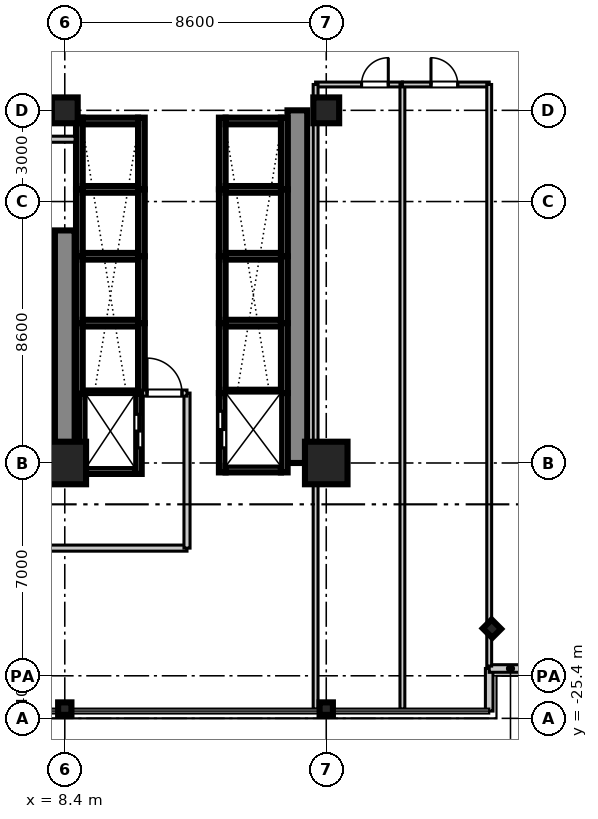
"""IFC4 building model, lengths in metres.
Left out: names, types, materials, properties, quantities, classifications, styles, units other than length and angle.
Written with IfcOpenShell. Run it as: python <this file> out.ifc"""

import sys

from ifc_helpers import new_model, si_unit, direction, frame, frame_2d, origin, origin_2d, place, context, subcontext, project, spatial, rectangle, i_section, extrude, source, transform, mapped, element, fill, save


model = new_model("IFC4")
c1 = context("Model", 3, precision=1e-05, world=origin(), true_north=direction((0.0, 1.0)))
c2 = subcontext(c1, "Body", "Model", "MODEL_VIEW")
j1 = project(units=[si_unit("LENGTHUNIT", "METRE"), si_unit("PLANEANGLEUNIT", "RADIAN")], contexts=[c1])
p1 = place(None, origin())
s1 = spatial("IfcSite", under=j1, at=p1, CompositionType="ELEMENT")
p2 = place(p1, origin())
s2 = spatial("IfcBuilding", under=s1, at=p2, CompositionType="ELEMENT")
p3 = place(p2, frame((0.0, 0.0, 61.6)))
s3 = spatial("IfcBuildingStorey", under=s2, at=p3, CompositionType="ELEMENT", Elevation=61.6)
m1 = source(origin(), c2, "Body", "SweptSolid", [
    extrude(rectangle(XDim=1.4, YDim=1.4, at=origin_2d()), origin(), (0.0, 0.0, 1.0), 3.605),
])
p4 = place(p3, frame((8.4, -17.0, 0.0), z_axis=(0.0, 0.0, 1.0), x_axis=(1.0, 0.0, 0.0)))
e1 = element("IfcColumn", 1, at=p4, inside=s3, PredefinedType="COLUMN", context=c2, shape_type="MappedRepresentation", body=[
    mapped(m1, transform((0.0, 0.0, 0.0), scale=1.0)),
])
m2 = source(origin(), c2, "Body", "SweptSolid", [
    extrude(rectangle(XDim=0.85, YDim=0.85, at=origin_2d()), origin(), (0.0, 0.0, 1.0), 3.605),
])
p5 = place(p3, frame((8.4, -5.4, 0.0), z_axis=(0.0, 0.0, 1.0), x_axis=(1.0, 0.0, 0.0)))
e2 = element("IfcColumn", 2, at=p5, inside=s3, PredefinedType="PILASTER", context=c2, shape_type="MappedRepresentation", body=[
    mapped(m2, transform((0.0, 0.0, 0.0), scale=1.0)),
])
p6 = place(p3, frame((17.0, -17.0, 0.0), z_axis=(0.0, 0.0, 1.0), x_axis=(1.0, 0.0, 0.0)))
e3 = element("IfcColumn", 3, at=p6, inside=s3, PredefinedType="COLUMN", context=c2, shape_type="MappedRepresentation", body=[
    mapped(m1, transform((0.0, 0.0, 0.0), scale=1.0)),
])
p7 = place(p3, frame((17.0, -5.4, 0.0), z_axis=(0.0, 0.0, 1.0), x_axis=(1.0, 0.0, 0.0)))
e4 = element("IfcColumn", 4, at=p7, inside=s3, PredefinedType="PILASTER", context=c2, shape_type="MappedRepresentation", body=[
    mapped(m2, transform((0.0, 0.0, 0.0), scale=1.0)),
])
m3 = source(origin(), c2, "Body", "SweptSolid", [
    extrude(i_section(OverallWidth=0.412, OverallDepth=0.438, WebThickness=0.023, FlangeThickness=0.036, at=origin_2d()), origin(), (0.0, 0.0, 1.0), 3.605),
])
for number, where, z_axis, x_axis in (
    (5, (8.4, -25.08, 0.0), (0.0, 0.0, 1.0), (0.0, 1.0, 0.0)),
    (6, (17.0, -25.08, 0.0), (0.0, 0.0, 1.0), (0.0, 1.0, 0.0)),
    (7, (22.45, -22.45, 0.0), (0.0, 0.0, 1.0), (0.707, 0.707, 0.0)),
):
    element("IfcColumn", number, at=place(p3, frame(where, z_axis=z_axis, x_axis=x_axis)), inside=s3, PredefinedType="COLUMN", context=c2, shape_type="MappedRepresentation", body=[
        mapped(m3, transform((0.0, 0.0, 0.0), scale=1.0)),
    ])
m4 = source(origin(), c2, "Body", "SweptSolid", [
    extrude(rectangle(XDim=7.65, YDim=0.65, at=frame_2d((3.825, 0.0))), origin(), (0.0, 0.0, 1.0), 3.37),
])
p8 = place(p3, frame((8.4, -17.0, 0.0), z_axis=(0.0, 0.0, 1.0), x_axis=(0.0, 1.0, 0.0)))
e8 = element("IfcWall", 8, at=p8, inside=s3, PredefinedType="SHEAR", context=c2, shape_type="MappedRepresentation", body=[
    mapped(m4, transform((0.0, 0.0, 0.0), scale=1.0)),
])
m5 = source(origin(), c2, "Body", "SweptSolid", [
    extrude(rectangle(XDim=11.6, YDim=0.65, at=frame_2d((5.8, 0.0))), origin(), (0.0, 0.0, 1.0), 3.37),
])
p9 = place(p3, frame((16.05, -17.0, 0.0), z_axis=(0.0, 0.0, 1.0), x_axis=(0.0, 1.0, 0.0)))
e9 = element("IfcWall", 9, at=p9, inside=s3, PredefinedType="SHEAR", context=c2, shape_type="MappedRepresentation", body=[
    mapped(m5, transform((0.0, 0.0, 0.0), scale=1.0)),
])
m6 = source(origin(), c2, "Body", "SweptSolid", [
    extrude(rectangle(XDim=2.36, YDim=0.22, at=frame_2d((1.18, 0.0))), origin(), (0.0, 0.0, 1.0), 3.37),
])
for number, where, z_axis, x_axis in (
    (10, (13.58, -8.0, 0.0), (0.0, 0.0, 1.0), (0.0, 1.0, 0.0)),
    (11, (15.62, -8.0, 0.0), (0.0, 0.0, 1.0), (0.0, 1.0, 0.0)),
):
    element("IfcWall", number, at=place(p3, frame(where, z_axis=z_axis, x_axis=x_axis)), inside=s3, PredefinedType="SHEAR", context=c2, shape_type="MappedRepresentation", body=[
        mapped(m6, transform((0.0, 0.0, 0.0), scale=1.0)),
    ])
m7 = source(origin(), c2, "Body", "SweptSolid", [
    extrude(rectangle(XDim=1.82, YDim=0.22, at=frame_2d((0.91, 0.0))), origin(), (0.0, 0.0, 1.0), 3.37),
])
p10 = place(p3, frame((13.69, -5.75, 0.0), z_axis=(0.0, 0.0, 1.0), x_axis=(1.0, 0.0, 0.0)))
e12 = element("IfcWall", 12, at=p10, inside=s3, PredefinedType="SHEAR", context=c2, shape_type="MappedRepresentation", body=[
    mapped(m7, transform((0.0, 0.0, 0.0), scale=1.0)),
])
m8 = source(origin(), c2, "Body", "SweptSolid", [
    extrude(rectangle(XDim=2.2, YDim=0.22, at=frame_2d((1.1, 0.0))), origin(), (0.0, 0.0, 1.0), 3.37),
])
for number, where, z_axis, x_axis in (
    (13, (13.58, -10.2, 0.0), (0.0, 0.0, 1.0), (0.0, 1.0, 0.0)),
    (14, (15.62, -10.2, 0.0), (0.0, 0.0, 1.0), (0.0, 1.0, 0.0)),
):
    element("IfcWall", number, at=place(p3, frame(where, z_axis=z_axis, x_axis=x_axis)), inside=s3, PredefinedType="SHEAR", context=c2, shape_type="MappedRepresentation", body=[
        mapped(m8, transform((0.0, 0.0, 0.0), scale=1.0)),
    ])
m9 = source(origin(), c2, "Body", "SweptSolid", [
    extrude(rectangle(XDim=1.82, YDim=0.22, at=frame_2d((0.91, 0.0))), origin(), (0.0, 0.0, 1.0), 3.65),
])
p11 = place(p3, frame((13.69, -8.0, 0.0), z_axis=(0.0, 0.0, 1.0), x_axis=(1.0, 0.0, 0.0)))
e15 = element("IfcWall", 15, at=p11, inside=s3, PredefinedType="SHEAR", context=c2, shape_type="MappedRepresentation", body=[
    mapped(m9, transform((0.0, 0.0, 0.0), scale=1.0)),
])
for number, where, z_axis, x_axis in (
    (16, (13.58, -12.4, 0.0), (0.0, 0.0, 1.0), (0.0, 1.0, 0.0)),
    (17, (15.62, -12.4, 0.0), (0.0, 0.0, 1.0), (0.0, 1.0, 0.0)),
):
    element("IfcWall", number, at=place(p3, frame(where, z_axis=z_axis, x_axis=x_axis)), inside=s3, PredefinedType="SHEAR", context=c2, shape_type="MappedRepresentation", body=[
        mapped(m8, transform((0.0, 0.0, 0.0), scale=1.0)),
    ])
p12 = place(p3, frame((13.69, -10.2, 0.0), z_axis=(0.0, 0.0, 1.0), x_axis=(1.0, 0.0, 0.0)))
e18 = element("IfcWall", 18, at=p12, inside=s3, PredefinedType="SHEAR", context=c2, shape_type="MappedRepresentation", body=[
    mapped(m9, transform((0.0, 0.0, 0.0), scale=1.0)),
])
m10 = source(origin(), c2, "Body", "SweptSolid", [
    extrude(rectangle(XDim=2.3, YDim=0.22, at=frame_2d((1.15, 0.0))), origin(), (0.0, 0.0, 1.0), 3.37),
])
for number, where, z_axis, x_axis in (
    (19, (13.58, -14.7, 0.0), (0.0, 0.0, 1.0), (0.0, 1.0, 0.0)),
    (20, (15.62, -14.7, 0.0), (0.0, 0.0, 1.0), (0.0, 1.0, 0.0)),
):
    element("IfcWall", number, at=place(p3, frame(where, z_axis=z_axis, x_axis=x_axis)), inside=s3, PredefinedType="SHEAR", context=c2, shape_type="MappedRepresentation", body=[
        mapped(m10, transform((0.0, 0.0, 0.0), scale=1.0)),
    ])
p13 = place(p3, frame((13.69, -12.4, 0.0), z_axis=(0.0, 0.0, 1.0), x_axis=(1.0, 0.0, 0.0)))
e21 = element("IfcWall", 21, at=p13, inside=s3, PredefinedType="SHEAR", context=c2, shape_type="MappedRepresentation", body=[
    mapped(m9, transform((0.0, 0.0, 0.0), scale=1.0)),
])
for number, where, z_axis, x_axis in (
    (22, (8.88, -8.0, 0.0), (0.0, 0.0, 1.0), (0.0, 1.0, 0.0)),
    (23, (10.92, -8.0, 0.0), (0.0, 0.0, 1.0), (0.0, 1.0, 0.0)),
):
    element("IfcWall", number, at=place(p3, frame(where, z_axis=z_axis, x_axis=x_axis)), inside=s3, PredefinedType="SHEAR", context=c2, shape_type="MappedRepresentation", body=[
        mapped(m6, transform((0.0, 0.0, 0.0), scale=1.0)),
    ])
p14 = place(p3, frame((8.99, -5.75, 0.0), z_axis=(0.0, 0.0, 1.0), x_axis=(1.0, 0.0, 0.0)))
e24 = element("IfcWall", 24, at=p14, inside=s3, PredefinedType="SHEAR", context=c2, shape_type="MappedRepresentation", body=[
    mapped(m7, transform((0.0, 0.0, 0.0), scale=1.0)),
])
for number, where, z_axis, x_axis in (
    (25, (8.88, -10.2, 0.0), (0.0, 0.0, 1.0), (0.0, 1.0, 0.0)),
    (26, (10.92, -10.2, 0.0), (0.0, 0.0, 1.0), (0.0, 1.0, 0.0)),
):
    element("IfcWall", number, at=place(p3, frame(where, z_axis=z_axis, x_axis=x_axis)), inside=s3, PredefinedType="SHEAR", context=c2, shape_type="MappedRepresentation", body=[
        mapped(m8, transform((0.0, 0.0, 0.0), scale=1.0)),
    ])
p15 = place(p3, frame((8.99, -8.0, 0.0), z_axis=(0.0, 0.0, 1.0), x_axis=(1.0, 0.0, 0.0)))
e27 = element("IfcWall", 27, at=p15, inside=s3, PredefinedType="SHEAR", context=c2, shape_type="MappedRepresentation", body=[
    mapped(m9, transform((0.0, 0.0, 0.0), scale=1.0)),
])
for number, where, z_axis, x_axis in (
    (28, (8.88, -12.4, 0.0), (0.0, 0.0, 1.0), (0.0, 1.0, 0.0)),
    (29, (10.92, -12.4, 0.0), (0.0, 0.0, 1.0), (0.0, 1.0, 0.0)),
):
    element("IfcWall", number, at=place(p3, frame(where, z_axis=z_axis, x_axis=x_axis)), inside=s3, PredefinedType="SHEAR", context=c2, shape_type="MappedRepresentation", body=[
        mapped(m8, transform((0.0, 0.0, 0.0), scale=1.0)),
    ])
p16 = place(p3, frame((8.99, -10.2, 0.0), z_axis=(0.0, 0.0, 1.0), x_axis=(1.0, 0.0, 0.0)))
e30 = element("IfcWall", 30, at=p16, inside=s3, PredefinedType="SHEAR", context=c2, shape_type="MappedRepresentation", body=[
    mapped(m9, transform((0.0, 0.0, 0.0), scale=1.0)),
])
m11 = source(origin(), c2, "Body", "SweptSolid", [
    extrude(rectangle(XDim=2.325, YDim=0.22, at=frame_2d((1.163, 0.0))), origin(), (0.0, 0.0, 1.0), 3.37),
])
for number, where, z_axis, x_axis in (
    (31, (8.88, -14.725, 0.0), (0.0, 0.0, 1.0), (0.0, 1.0, 0.0)),
    (32, (10.92, -14.725, 0.0), (0.0, 0.0, 1.0), (0.0, 1.0, 0.0)),
):
    element("IfcWall", number, at=place(p3, frame(where, z_axis=z_axis, x_axis=x_axis)), inside=s3, PredefinedType="SHEAR", context=c2, shape_type="MappedRepresentation", body=[
        mapped(m11, transform((0.0, 0.0, 0.0), scale=1.0)),
    ])
p17 = place(p3, frame((8.99, -12.4, 0.0), z_axis=(0.0, 0.0, 1.0), x_axis=(1.0, 0.0, 0.0)))
e33 = element("IfcWall", 33, at=p17, inside=s3, PredefinedType="SHEAR", context=c2, shape_type="MappedRepresentation", body=[
    mapped(m9, transform((0.0, 0.0, 0.0), scale=1.0)),
])
m12 = source(origin(), c2, "Body", "SweptSolid", [
    extrude(rectangle(XDim=2.635, YDim=0.22, at=frame_2d((1.317, 0.0))), origin(), (0.0, 0.0, 1.0), 3.37),
])
p18 = place(p3, frame((8.98, -17.36, 0.0), z_axis=(0.0, 0.0, 1.0), x_axis=(0.0, 1.0, 0.0)))
e34 = element("IfcWall", 34, at=p18, inside=s3, PredefinedType="SHEAR", context=c2, shape_type="MappedRepresentation", body=[
    mapped(m12, transform((0.0, 0.0, 0.0), scale=1.0)),
])
p19 = place(p3, frame((10.82, -17.36, 0.0), z_axis=(0.0, 0.0, 1.0), x_axis=(0.0, 1.0, 0.0)))
e35 = element("IfcWall", 35, at=p19, inside=s3, PredefinedType="SHEAR", context=c2, shape_type="MappedRepresentation", body=[
    mapped(m12, transform((0.0, 0.0, 0.0), scale=1.0)),
])
p20 = place(p19, frame((0.86, 0.0, 0.0)))
e36 = element("IfcOpeningElement", 36, at=p20, cuts=e35, PredefinedType="OPENING", context=c2, shape_type="SweptSolid", body=[
    extrude(rectangle(XDim=1.1, YDim=2.2, at=frame_2d((0.55, 1.1))), frame((0.0, 0.12, 0.0), z_axis=(0.0, -1.0, 0.0), x_axis=(1.0, 0.0, 0.0)), (0.0, 0.0, 1.0), 0.24),
])
m13 = source(origin(), c2, "Body", "SweptSolid", [
    extrude(rectangle(XDim=1.62, YDim=0.22, at=frame_2d((0.81, 0.0))), origin(), (0.0, 0.0, 1.0), 3.37),
])
p21 = place(p3, frame((9.09, -17.25, 0.0), z_axis=(0.0, 0.0, 1.0), x_axis=(1.0, 0.0, 0.0)))
e37 = element("IfcWall", 37, at=p21, inside=s3, PredefinedType="SHEAR", context=c2, shape_type="MappedRepresentation", body=[
    mapped(m13, transform((0.0, 0.0, 0.0), scale=1.0)),
])
m14 = source(origin(), c2, "Body", "SweptSolid", [
    extrude(rectangle(XDim=1.62, YDim=0.22, at=frame_2d((0.81, 0.0))), origin(), (0.0, 0.0, 1.0), 3.65),
])
p22 = place(p3, frame((9.09, -14.725, 0.0), z_axis=(0.0, 0.0, 1.0), x_axis=(1.0, 0.0, 0.0)))
e38 = element("IfcWall", 38, at=p22, inside=s3, PredefinedType="SHEAR", context=c2, shape_type="MappedRepresentation", body=[
    mapped(m14, transform((0.0, 0.0, 0.0), scale=1.0)),
])
m15 = source(origin(), c2, "Body", "SweptSolid", [
    extrude(rectangle(XDim=2.61, YDim=0.22, at=frame_2d((1.305, 0.0))), origin(), (0.0, 0.0, 1.0), 3.37),
])
p23 = place(p3, frame((13.58, -17.31, 0.0), z_axis=(0.0, 0.0, 1.0), x_axis=(0.0, 1.0, 0.0)))
e39 = element("IfcWall", 39, at=p23, inside=s3, PredefinedType="SHEAR", context=c2, shape_type="MappedRepresentation", body=[
    mapped(m15, transform((0.0, 0.0, 0.0), scale=1.0)),
])
p24 = place(p23, frame((0.81, 0.0, 0.0)))
e40 = element("IfcOpeningElement", 40, at=p24, cuts=e39, PredefinedType="OPENING", context=c2, shape_type="SweptSolid", body=[
    extrude(rectangle(XDim=1.2, YDim=2.2, at=frame_2d((0.6, 1.1))), frame((0.0, 0.12, 0.0), z_axis=(0.0, -1.0, 0.0), x_axis=(1.0, 0.0, 0.0)), (0.0, 0.0, 1.0), 0.24),
])
p25 = place(p3, frame((15.62, -17.31, 0.0), z_axis=(0.0, 0.0, 1.0), x_axis=(0.0, 1.0, 0.0)))
e41 = element("IfcWall", 41, at=p25, inside=s3, PredefinedType="SHEAR", context=c2, shape_type="MappedRepresentation", body=[
    mapped(m15, transform((0.0, 0.0, 0.0), scale=1.0)),
])
p26 = place(p3, frame((13.69, -17.2, 0.0), z_axis=(0.0, 0.0, 1.0), x_axis=(1.0, 0.0, 0.0)))
e42 = element("IfcWall", 42, at=p26, inside=s3, PredefinedType="SHEAR", context=c2, shape_type="MappedRepresentation", body=[
    mapped(m7, transform((0.0, 0.0, 0.0), scale=1.0)),
])
p27 = place(p3, frame((13.69, -14.7, 0.0), z_axis=(0.0, 0.0, 1.0), x_axis=(1.0, 0.0, 0.0)))
e43 = element("IfcWall", 43, at=p27, inside=s3, PredefinedType="SHEAR", context=c2, shape_type="MappedRepresentation", body=[
    mapped(m9, transform((0.0, 0.0, 0.0), scale=1.0)),
])
m16 = source(origin(), c2, "Body", "SweptSolid", [
    extrude(rectangle(XDim=1.4, YDim=0.25, at=frame_2d((0.7, 0.0))), origin(), (0.0, 0.0, 1.0), 3.37),
])
for number, where, z_axis, x_axis in (
    (44, (22.36, -25.16, 0.0), (0.0, 0.0, 1.0), (0.0, 1.0, 0.0)),
    (45, (22.36, -23.76, 0.0), (0.0, 0.0, 1.0), (1.0, 0.0, 0.0)),
):
    element("IfcWall", number, at=place(p3, frame(where, z_axis=z_axis, x_axis=x_axis)), inside=s3, PredefinedType="STANDARD", context=c2, shape_type="MappedRepresentation", body=[
        mapped(m16, transform((0.0, 0.0, 0.0), scale=1.0)),
    ])
m17 = source(origin(), c2, "Body", "SweptSolid", [
    extrude(rectangle(XDim=5.82, YDim=0.2, at=frame_2d((2.91, 0.0))), origin(), (0.0, 0.0, 1.0), 2.71),
])
p28 = place(p3, frame((6.6, -19.8, 0.0), z_axis=(0.0, 0.0, 1.0), x_axis=(1.0, 0.0, 0.0)))
e46 = element("IfcWall", 46, at=p28, inside=s3, PredefinedType="PARTITIONING", context=c2, shape_type="MappedRepresentation", body=[
    mapped(m17, transform((0.0, 0.0, 0.0), scale=1.0)),
])
m18 = source(origin(), c2, "Body", "SweptSolid", [
    extrude(rectangle(XDim=5.1, YDim=0.2, at=frame_2d((2.55, 0.0))), origin(), (0.0, 0.0, 1.0), 2.71),
])
p29 = place(p3, frame((12.42, -19.8, 0.0), z_axis=(0.0, 0.0, 1.0), x_axis=(0.0, 1.0, 0.0)))
e47 = element("IfcWall", 47, at=p29, inside=s3, PredefinedType="PARTITIONING", context=c2, shape_type="MappedRepresentation", body=[
    mapped(m18, transform((0.0, 0.0, 0.0), scale=1.0)),
])
m19 = source(origin(), c2, "Body", "SweptSolid", [
    extrude(rectangle(XDim=1.46, YDim=0.2, at=frame_2d((0.73, 0.0))), origin(), (0.0, 0.0, 1.0), 2.71),
])
p30 = place(p3, frame((10.96, -14.7, 0.0), z_axis=(0.0, 0.0, 1.0), x_axis=(1.0, 0.0, 0.0)))
e48 = element("IfcWall", 48, at=p30, inside=s3, PredefinedType="PARTITIONING", context=c2, shape_type="MappedRepresentation", body=[
    mapped(m19, transform((0.0, 0.0, 0.0), scale=1.0)),
])
p31 = place(p30, frame((0.145, 0.0, 0.0)))
e49 = element("IfcOpeningElement", 49, at=p31, cuts=e48, PredefinedType="OPENING", context=c2, shape_type="SweptSolid", body=[
    extrude(rectangle(XDim=1.15, YDim=2.15, at=frame_2d((0.575, 1.075))), frame((0.0, 0.11, 0.0), z_axis=(0.0, -1.0, 0.0), x_axis=(1.0, 0.0, 0.0)), (0.0, 0.0, 1.0), 0.22),
])
m20 = source(origin(), c2, "Body", "SweptSolid", [
    extrude(rectangle(XDim=0.97, YDim=0.2, at=frame_2d((0.485, 0.0))), origin(), (0.0, 0.0, 1.0), 2.71),
])
p32 = place(p3, frame((7.77, -6.35, 0.0), z_axis=(0.0, 0.0, 1.0), x_axis=(1.0, 0.0, 0.0)))
e50 = element("IfcWall", 50, at=p32, inside=s3, PredefinedType="PARTITIONING", context=c2, shape_type="MappedRepresentation", body=[
    mapped(m20, transform((0.0, 0.0, 0.0), scale=1.0)),
])
m21 = source(origin(), c2, "Body", "SweptSolid", [
    extrude(rectangle(XDim=2.855, YDim=0.16, at=frame_2d((1.427, 0.0))), origin(), (0.0, 0.0, 1.0), 2.71),
])
p33 = place(p3, frame((16.65, -4.55, 0.0), z_axis=(0.0, 0.0, 1.0), x_axis=(1.0, 0.0, 0.0)))
e51 = element("IfcWall", 51, at=p33, inside=s3, PredefinedType="PARTITIONING", context=c2, shape_type="MappedRepresentation", body=[
    mapped(m21, transform((0.0, 0.0, 0.0), scale=1.0)),
])
p34 = place(p33, frame((1.511, 0.0, 0.0)))
e52 = element("IfcOpeningElement", 52, at=p34, cuts=e51, PredefinedType="OPENING", context=c2, shape_type="SweptSolid", body=[
    extrude(rectangle(XDim=0.88, YDim=2.1, at=frame_2d((0.44, 1.05))), frame((0.0, 0.09, 0.0), z_axis=(0.0, -1.0, 0.0), x_axis=(1.0, 0.0, 0.0)), (0.0, 0.0, 1.0), 0.18),
])
m22 = source(origin(), c2, "Body", "SweptSolid", [
    extrude(rectangle(XDim=20.55, YDim=0.16, at=frame_2d((10.275, 0.0))), origin(), (0.0, 0.0, 1.0), 2.71),
])
for number, where, z_axis, x_axis in (
    (53, (16.65, -25.1, 0.0), (0.0, 0.0, 1.0), (0.0, 1.0, 0.0)),
    (54, (19.505, -25.1, 0.0), (0.0, 0.0, 1.0), (0.0, 1.0, 0.0)),
):
    element("IfcWall", number, at=place(p3, frame(where, z_axis=z_axis, x_axis=x_axis)), inside=s3, PredefinedType="PARTITIONING", context=c2, shape_type="MappedRepresentation", body=[
        mapped(m22, transform((0.0, 0.0, 0.0), scale=1.0)),
    ])
m23 = source(origin(), c2, "Body", "SweptSolid", [
    extrude(rectangle(XDim=2.855, YDim=0.16, at=frame_2d((1.428, 0.0))), origin(), (0.0, 0.0, 1.0), 2.71),
])
p35 = place(p3, frame((19.505, -4.55, 0.0), z_axis=(0.0, 0.0, 1.0), x_axis=(1.0, 0.0, 0.0)))
e55 = element("IfcWall", 55, at=p35, inside=s3, PredefinedType="PARTITIONING", context=c2, shape_type="MappedRepresentation", body=[
    mapped(m23, transform((0.0, 0.0, 0.0), scale=1.0)),
])
p36 = place(p35, frame((0.94, 0.0, 0.0)))
e56 = element("IfcOpeningElement", 56, at=p36, cuts=e55, PredefinedType="OPENING", context=c2, shape_type="SweptSolid", body=[
    extrude(rectangle(XDim=0.88, YDim=2.1, at=frame_2d((0.44, 1.05))), frame((0.0, 0.09, 0.0), z_axis=(0.0, -1.0, 0.0), x_axis=(1.0, 0.0, 0.0)), (0.0, 0.0, 1.0), 0.18),
])
m24 = source(origin(), c2, "Body", "SweptSolid", [
    extrude(rectangle(XDim=19.13, YDim=0.16, at=frame_2d((9.565, 0.0))), origin(), (0.0, 0.0, 1.0), 2.71),
])
p37 = place(p3, frame((22.36, -23.68, 0.0), z_axis=(0.0, 0.0, 1.0), x_axis=(0.0, 1.0, 0.0)))
e57 = element("IfcWall", 57, at=p37, inside=s3, PredefinedType="PARTITIONING", context=c2, shape_type="MappedRepresentation", body=[
    mapped(m24, transform((0.0, 0.0, 0.0), scale=1.0)),
])
m25 = source(origin(), c2, "Body", "SweptSolid", [
    extrude(rectangle(XDim=1.1, YDim=2.2, at=frame_2d((0.55, 1.1))), frame((0.0, 0.025, 0.0), z_axis=(0.0, -1.0, 0.0), x_axis=(1.0, 0.0, 0.0)), (0.0, 0.0, 1.0), 0.05),
])
p38 = place(p20, frame((1.1, 0.0, 0.0), z_axis=(0.0, 0.0, 1.0), x_axis=(-1.0, 0.0, 0.0)))
e58 = element("IfcDoor", 58, at=p38, inside=s3, OperationType="DOUBLE_DOOR_SLIDING", PredefinedType="DOOR", context=c2, shape_type="MappedRepresentation", body=[
    mapped(m25, transform((0.0, 0.0, 0.0), scale=1.0)),
])
fill(e36, e58)
m26 = source(origin(), c2, "Body", "SweptSolid", [
    extrude(rectangle(XDim=1.2, YDim=2.2, at=frame_2d((0.6, 1.1))), frame((0.0, 0.025, 0.0), z_axis=(0.0, -1.0, 0.0), x_axis=(1.0, 0.0, 0.0)), (0.0, 0.0, 1.0), 0.05),
])
p39 = place(p24, origin())
e59 = element("IfcDoor", 59, at=p39, inside=s3, OperationType="DOUBLE_DOOR_SLIDING", PredefinedType="DOOR", context=c2, shape_type="MappedRepresentation", body=[
    mapped(m26, transform((0.0, 0.0, 0.0), scale=1.0)),
])
fill(e40, e59)
m27 = source(origin(), c2, "Body", "SweptSolid", [
    extrude(rectangle(XDim=1.15, YDim=2.15, at=frame_2d((0.575, 1.075))), frame((0.0, 0.025, 0.0), z_axis=(0.0, -1.0, 0.0), x_axis=(1.0, 0.0, 0.0)), (0.0, 0.0, 1.0), 0.05),
])
p40 = place(p31, origin())
e60 = element("IfcDoor", 60, at=p40, inside=s3, OperationType="SINGLE_SWING_LEFT", PredefinedType="DOOR", context=c2, shape_type="MappedRepresentation", body=[
    mapped(m27, transform((0.0, 0.0, 0.0), scale=1.0)),
])
fill(e49, e60)
m28 = source(origin(), c2, "Body", "SweptSolid", [
    extrude(rectangle(XDim=0.88, YDim=2.1, at=frame_2d((0.44, 1.05))), frame((0.0, 0.025, 0.0), z_axis=(0.0, -1.0, 0.0), x_axis=(1.0, 0.0, 0.0)), (0.0, 0.0, 1.0), 0.05),
])
p41 = place(p34, frame((0.88, 0.0, 0.0), z_axis=(0.0, 0.0, 1.0), x_axis=(-1.0, 0.0, 0.0)))
e61 = element("IfcDoor", 61, at=p41, inside=s3, OperationType="SINGLE_SWING_RIGHT", PredefinedType="DOOR", context=c2, shape_type="MappedRepresentation", body=[
    mapped(m28, transform((0.0, 0.0, 0.0), scale=1.0)),
])
fill(e52, e61)
p42 = place(p36, frame((0.88, 0.0, 0.0), z_axis=(0.0, 0.0, 1.0), x_axis=(-1.0, 0.0, 0.0)))
e62 = element("IfcDoor", 62, at=p42, inside=s3, OperationType="SINGLE_SWING_LEFT", PredefinedType="DOOR", context=c2, shape_type="MappedRepresentation", body=[
    mapped(m28, transform((0.0, 0.0, 0.0), scale=1.0)),
])
fill(e56, e62)
save(model, sys.argv[1])
